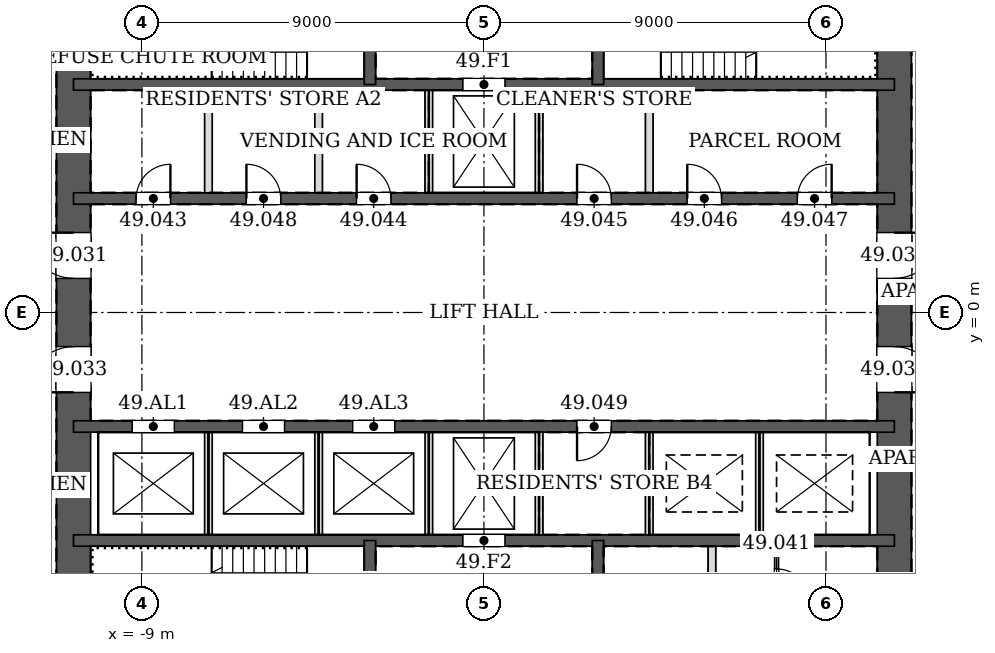
"""IFC4 building model, lengths in metres.
Left out: names, types, materials, properties, quantities, classifications, styles, units other than length and angle.
Written with IfcOpenShell. Run it as: python <this file> out.ifc"""

import sys

from ifc_helpers import new_model, si_unit, direction, frame, frame_2d, origin, place, context, subcontext, project, spatial, rectangle, extrude, element, fill, save


model = new_model("IFC4")
c1 = context("Model", 3, precision=1e-05, world=origin(), true_north=direction((0.0, 1.0)))
c2 = subcontext(c1, "Body", "Model", "MODEL_VIEW")
j1 = project(units=[si_unit("LENGTHUNIT", "METRE"), si_unit("PLANEANGLEUNIT", "RADIAN")], contexts=[c1])
p1 = place(None, origin())
s1 = spatial("IfcSite", under=j1, at=p1, CompositionType="ELEMENT")
p2 = place(p1, origin())
s2 = spatial("IfcBuilding", under=s1, at=p2, CompositionType="ELEMENT")
p3 = place(p2, frame((0.0, 0.0, 214.2)))
s3 = spatial("IfcBuildingStorey", under=s2, at=p3, CompositionType="ELEMENT", Elevation=214.2)
p4 = place(p3, frame((10.8, -10.8, 0.0), z_axis=(0.0, 0.0, 1.0), x_axis=(0.0, 1.0, 0.0)))
e1 = element("IfcWall", 1, at=p4, inside=s3, PredefinedType="SOLIDWALL", context=c2, shape_type="SweptSolid", body=[
    extrude(rectangle(XDim=21.6, YDim=0.9, at=frame_2d((10.8, 0.0))), origin(), (0.0, 0.0, 1.0), 3.4),
])
p5 = place(p4, frame((11.7, 0.0, 0.0)))
e2 = element("IfcOpeningElement", 2, at=p5, cuts=e1, PredefinedType="OPENING", context=c2, shape_type="SweptSolid", body=[
    extrude(rectangle(XDim=1.2, YDim=2.1, at=frame_2d((0.6, 1.05))), frame((0.0, 0.46, 0.0), z_axis=(0.0, -1.0, 0.0), x_axis=(1.0, 0.0, 0.0)), (0.0, 0.0, 1.0), 0.92),
])
p6 = place(p4, frame((8.7, 0.0, 0.0)))
e3 = element("IfcOpeningElement", 3, at=p6, cuts=e1, PredefinedType="OPENING", context=c2, shape_type="SweptSolid", body=[
    extrude(rectangle(XDim=1.2, YDim=2.1, at=frame_2d((0.6, 1.05))), frame((0.0, 0.46, 0.0), z_axis=(0.0, -1.0, 0.0), x_axis=(1.0, 0.0, 0.0)), (0.0, 0.0, 1.0), 0.92),
])
p7 = place(p3, frame((-10.8, 10.8, 0.0), z_axis=(0.0, 0.0, 1.0), x_axis=(0.0, -1.0, 0.0)))
e4 = element("IfcWall", 4, at=p7, inside=s3, PredefinedType="SOLIDWALL", context=c2, shape_type="SweptSolid", body=[
    extrude(rectangle(XDim=21.6, YDim=0.9, at=frame_2d((10.8, 0.0))), origin(), (0.0, 0.0, 1.0), 3.4),
])
p8 = place(p7, frame((8.7, 0.0, 0.0)))
e5 = element("IfcOpeningElement", 5, at=p8, cuts=e4, PredefinedType="OPENING", context=c2, shape_type="SweptSolid", body=[
    extrude(rectangle(XDim=1.2, YDim=2.1, at=frame_2d((0.6, 1.05))), frame((0.0, 0.46, 0.0), z_axis=(0.0, -1.0, 0.0), x_axis=(1.0, 0.0, 0.0)), (0.0, 0.0, 1.0), 0.92),
])
p9 = place(p7, frame((11.7, 0.0, 0.0)))
e6 = element("IfcOpeningElement", 6, at=p9, cuts=e4, PredefinedType="OPENING", context=c2, shape_type="SweptSolid", body=[
    extrude(rectangle(XDim=1.2, YDim=2.1, at=frame_2d((0.6, 1.05))), frame((0.0, 0.46, 0.0), z_axis=(0.0, -1.0, 0.0), x_axis=(1.0, 0.0, 0.0)), (0.0, 0.0, 1.0), 0.92),
])
p10 = place(p3, frame((-10.8, 3.0, 0.0), z_axis=(0.0, 0.0, 1.0), x_axis=(1.0, 0.0, 0.0)))
e7 = element("IfcWall", 7, at=p10, inside=s3, PredefinedType="SOLIDWALL", context=c2, shape_type="SweptSolid", body=[
    extrude(rectangle(XDim=21.6, YDim=0.3, at=frame_2d((10.8, 0.0))), origin(), (0.0, 0.0, 1.0), 3.4),
])
p11 = place(p10, frame((1.65, 0.0, 0.0)))
e8 = element("IfcOpeningElement", 8, at=p11, cuts=e7, PredefinedType="OPENING", context=c2, shape_type="SweptSolid", body=[
    extrude(rectangle(XDim=0.9, YDim=2.1, at=frame_2d((0.45, 1.05))), frame((0.0, 0.16, 0.0), z_axis=(0.0, -1.0, 0.0), x_axis=(1.0, 0.0, 0.0)), (0.0, 0.0, 1.0), 0.32),
])
p12 = place(p10, frame((7.45, 0.0, 0.0)))
e9 = element("IfcOpeningElement", 9, at=p12, cuts=e7, PredefinedType="OPENING", context=c2, shape_type="SweptSolid", body=[
    extrude(rectangle(XDim=0.9, YDim=2.1, at=frame_2d((0.45, 1.05))), frame((0.0, 0.16, 0.0), z_axis=(0.0, -1.0, 0.0), x_axis=(1.0, 0.0, 0.0)), (0.0, 0.0, 1.0), 0.32),
])
p13 = place(p10, frame((13.25, 0.0, 0.0)))
e10 = element("IfcOpeningElement", 10, at=p13, cuts=e7, PredefinedType="OPENING", context=c2, shape_type="SweptSolid", body=[
    extrude(rectangle(XDim=0.9, YDim=2.1, at=frame_2d((0.45, 1.05))), frame((0.0, 0.16, 0.0), z_axis=(0.0, -1.0, 0.0), x_axis=(1.0, 0.0, 0.0)), (0.0, 0.0, 1.0), 0.32),
])
p14 = place(p10, frame((16.15, 0.0, 0.0)))
e11 = element("IfcOpeningElement", 11, at=p14, cuts=e7, PredefinedType="OPENING", context=c2, shape_type="SweptSolid", body=[
    extrude(rectangle(XDim=0.9, YDim=2.1, at=frame_2d((0.45, 1.05))), frame((0.0, 0.16, 0.0), z_axis=(0.0, -1.0, 0.0), x_axis=(1.0, 0.0, 0.0)), (0.0, 0.0, 1.0), 0.32),
])
p15 = place(p10, frame((19.05, 0.0, 0.0)))
e12 = element("IfcOpeningElement", 12, at=p15, cuts=e7, PredefinedType="OPENING", context=c2, shape_type="SweptSolid", body=[
    extrude(rectangle(XDim=0.9, YDim=2.1, at=frame_2d((0.45, 1.05))), frame((0.0, 0.16, 0.0), z_axis=(0.0, -1.0, 0.0), x_axis=(1.0, 0.0, 0.0)), (0.0, 0.0, 1.0), 0.32),
])
p16 = place(p10, frame((4.55, 0.0, 0.0)))
e13 = element("IfcOpeningElement", 13, at=p16, cuts=e7, PredefinedType="OPENING", context=c2, shape_type="SweptSolid", body=[
    extrude(rectangle(XDim=0.9, YDim=2.1, at=frame_2d((0.45, 1.05))), frame((0.0, 0.16, 0.0), z_axis=(0.0, -1.0, 0.0), x_axis=(1.0, 0.0, 0.0)), (0.0, 0.0, 1.0), 0.32),
])
p17 = place(p3, frame((-10.8, 6.0, 0.0), z_axis=(0.0, 0.0, 1.0), x_axis=(1.0, 0.0, 0.0)))
e14 = element("IfcWall", 14, at=p17, inside=s3, PredefinedType="SOLIDWALL", context=c2, shape_type="SweptSolid", body=[
    extrude(rectangle(XDim=21.6, YDim=0.3, at=frame_2d((10.8, 0.0))), origin(), (0.0, 0.0, 1.0), 3.4),
])
p18 = place(p17, frame((10.25, 0.0, 0.0)))
e15 = element("IfcOpeningElement", 15, at=p18, cuts=e14, PredefinedType="OPENING", context=c2, shape_type="SweptSolid", body=[
    extrude(rectangle(XDim=1.1, YDim=2.1, at=frame_2d((0.55, 1.05))), frame((0.0, 0.16, 0.0), z_axis=(0.0, -1.0, 0.0), x_axis=(1.0, 0.0, 0.0)), (0.0, 0.0, 1.0), 0.32),
])
p19 = place(p3, frame((-3.0, 6.0, 0.0), z_axis=(0.0, 0.0, 1.0), x_axis=(0.0, 1.0, 0.0)))
e16 = element("IfcWall", 16, at=p19, inside=s3, PredefinedType="SOLIDWALL", context=c2, shape_type="SweptSolid", body=[
    extrude(rectangle(XDim=4.8, YDim=0.3, at=frame_2d((2.4, 0.0))), origin(), (0.0, 0.0, 1.0), 3.4),
])
p20 = place(p19, frame((1.75, 0.0, 0.0)))
e17 = element("IfcOpeningElement", 17, at=p20, cuts=e16, PredefinedType="OPENING", context=c2, shape_type="SweptSolid", body=[
    extrude(rectangle(XDim=1.0, YDim=2.1, at=frame_2d((0.5, 1.05))), frame((0.0, 0.16, 0.0), z_axis=(0.0, -1.0, 0.0), x_axis=(1.0, 0.0, 0.0)), (0.0, 0.0, 1.0), 0.32),
])
p21 = place(p3, frame((3.0, 6.0, 0.0), z_axis=(0.0, 0.0, 1.0), x_axis=(0.0, 1.0, 0.0)))
e18 = element("IfcWall", 18, at=p21, inside=s3, PredefinedType="SOLIDWALL", context=c2, shape_type="SweptSolid", body=[
    extrude(rectangle(XDim=4.8, YDim=0.3, at=frame_2d((2.4, 0.0))), origin(), (0.0, 0.0, 1.0), 3.4),
])
p22 = place(p21, frame((1.75, 0.0, 0.0)))
e19 = element("IfcOpeningElement", 19, at=p22, cuts=e18, PredefinedType="OPENING", context=c2, shape_type="SweptSolid", body=[
    extrude(rectangle(XDim=1.0, YDim=2.1, at=frame_2d((0.5, 1.05))), frame((0.0, 0.16, 0.0), z_axis=(0.0, -1.0, 0.0), x_axis=(1.0, 0.0, 0.0)), (0.0, 0.0, 1.0), 0.32),
])
p23 = place(p3, frame((-10.8, -3.0, 0.0), z_axis=(0.0, 0.0, 1.0), x_axis=(1.0, 0.0, 0.0)))
e20 = element("IfcWall", 20, at=p23, inside=s3, PredefinedType="SOLIDWALL", context=c2, shape_type="SweptSolid", body=[
    extrude(rectangle(XDim=21.6, YDim=0.3, at=frame_2d((10.8, 0.0))), origin(), (0.0, 0.0, 1.0), 3.4),
])
p24 = place(p23, frame((13.25, 0.0, 0.0)))
e21 = element("IfcOpeningElement", 21, at=p24, cuts=e20, PredefinedType="OPENING", context=c2, shape_type="SweptSolid", body=[
    extrude(rectangle(XDim=0.9, YDim=2.1, at=frame_2d((0.45, 1.05))), frame((0.0, 0.16, 0.0), z_axis=(0.0, -1.0, 0.0), x_axis=(1.0, 0.0, 0.0)), (0.0, 0.0, 1.0), 0.32),
])
p25 = place(p23, frame((1.55, 0.0, 0.0)))
e22 = element("IfcOpeningElement", 22, at=p25, cuts=e20, PredefinedType="OPENING", context=c2, shape_type="SweptSolid", body=[
    extrude(rectangle(XDim=1.1, YDim=2.1, at=frame_2d((0.55, 1.05))), frame((0.0, 0.16, 0.0), z_axis=(0.0, -1.0, 0.0), x_axis=(1.0, 0.0, 0.0)), (0.0, 0.0, 1.0), 0.32),
])
p26 = place(p23, frame((4.45, 0.0, 0.0)))
e23 = element("IfcOpeningElement", 23, at=p26, cuts=e20, PredefinedType="OPENING", context=c2, shape_type="SweptSolid", body=[
    extrude(rectangle(XDim=1.1, YDim=2.1, at=frame_2d((0.55, 1.05))), frame((0.0, 0.16, 0.0), z_axis=(0.0, -1.0, 0.0), x_axis=(1.0, 0.0, 0.0)), (0.0, 0.0, 1.0), 0.32),
])
p27 = place(p23, frame((7.35, 0.0, 0.0)))
e24 = element("IfcOpeningElement", 24, at=p27, cuts=e20, PredefinedType="OPENING", context=c2, shape_type="SweptSolid", body=[
    extrude(rectangle(XDim=1.1, YDim=2.1, at=frame_2d((0.55, 1.05))), frame((0.0, 0.16, 0.0), z_axis=(0.0, -1.0, 0.0), x_axis=(1.0, 0.0, 0.0)), (0.0, 0.0, 1.0), 0.32),
])
p28 = place(p3, frame((-10.8, -6.0, 0.0), z_axis=(0.0, 0.0, 1.0), x_axis=(1.0, 0.0, 0.0)))
e25 = element("IfcWall", 25, at=p28, inside=s3, PredefinedType="SOLIDWALL", context=c2, shape_type="SweptSolid", body=[
    extrude(rectangle(XDim=21.6, YDim=0.3, at=frame_2d((10.8, 0.0))), origin(), (0.0, 0.0, 1.0), 3.4),
])
p29 = place(p28, frame((10.25, 0.0, 0.0)))
e26 = element("IfcOpeningElement", 26, at=p29, cuts=e25, PredefinedType="OPENING", context=c2, shape_type="SweptSolid", body=[
    extrude(rectangle(XDim=1.1, YDim=2.1, at=frame_2d((0.55, 1.05))), frame((0.0, 0.16, 0.0), z_axis=(0.0, -1.0, 0.0), x_axis=(1.0, 0.0, 0.0)), (0.0, 0.0, 1.0), 0.32),
])
p30 = place(p3, frame((-3.0, -6.0, 0.0), z_axis=(0.0, 0.0, 1.0), x_axis=(0.0, -1.0, 0.0)))
e27 = element("IfcWall", 27, at=p30, inside=s3, PredefinedType="SOLIDWALL", context=c2, shape_type="SweptSolid", body=[
    extrude(rectangle(XDim=4.8, YDim=0.3, at=frame_2d((2.4, 0.0))), origin(), (0.0, 0.0, 1.0), 3.4),
])
p31 = place(p30, frame((1.75, 0.0, 0.0)))
e28 = element("IfcOpeningElement", 28, at=p31, cuts=e27, PredefinedType="OPENING", context=c2, shape_type="SweptSolid", body=[
    extrude(rectangle(XDim=1.0, YDim=2.1, at=frame_2d((0.5, 1.05))), frame((0.0, 0.16, 0.0), z_axis=(0.0, -1.0, 0.0), x_axis=(1.0, 0.0, 0.0)), (0.0, 0.0, 1.0), 0.32),
])
p32 = place(p3, frame((3.0, -6.0, 0.0), z_axis=(0.0, 0.0, 1.0), x_axis=(0.0, -1.0, 0.0)))
e29 = element("IfcWall", 29, at=p32, inside=s3, PredefinedType="SOLIDWALL", context=c2, shape_type="SweptSolid", body=[
    extrude(rectangle(XDim=4.8, YDim=0.3, at=frame_2d((2.4, 0.0))), origin(), (0.0, 0.0, 1.0), 3.4),
])
for number, where, z_axis, x_axis in (
    (30, (-7.25, 3.15, 0.0), (0.0, 0.0, 1.0), (0.0, 1.0, 0.0)),
    (31, (-4.35, 3.15, 0.0), (0.0, 0.0, 1.0), (0.0, 1.0, 0.0)),
    (32, (-1.45, 3.15, 0.0), (0.0, 0.0, 1.0), (0.0, 1.0, 0.0)),
    (33, (1.45, 3.15, 0.0), (0.0, 0.0, 1.0), (0.0, 1.0, 0.0)),
    (34, (4.35, 3.15, 0.0), (0.0, 0.0, 1.0), (0.0, 1.0, 0.0)),
):
    element("IfcWall", number, at=place(p3, frame(where, z_axis=z_axis, x_axis=x_axis)), inside=s3, PredefinedType="PARTITIONING", context=c2, shape_type="SweptSolid", body=[
        extrude(rectangle(XDim=2.7, YDim=0.2, at=frame_2d((1.35, 0.0))), origin(), (0.0, 0.0, 1.0), 3.2),
    ])
for number, where, z_axis, x_axis in (
    (35, (-7.25, -5.85, 0.0), (0.0, 0.0, 1.0), (0.0, 1.0, 0.0)),
    (36, (-4.35, -5.85, 0.0), (0.0, 0.0, 1.0), (0.0, 1.0, 0.0)),
    (37, (-1.45, -5.85, 0.0), (0.0, 0.0, 1.0), (0.0, 1.0, 0.0)),
):
    element("IfcWall", number, at=place(p3, frame(where, z_axis=z_axis, x_axis=x_axis)), inside=s3, PredefinedType="PARTITIONING", context=c2, shape_type="SweptSolid", body=[
        extrude(rectangle(XDim=2.7, YDim=0.2, at=frame_2d((1.35, 0.0))), origin(), (0.0, 0.0, 1.0), 3.4),
    ])
for number, where, z_axis, x_axis in (
    (38, (1.45, -5.85, 0.0), (0.0, 0.0, 1.0), (0.0, 1.0, 0.0)),
    (39, (4.35, -5.85, 0.0), (0.0, 0.0, 1.0), (0.0, 1.0, 0.0)),
):
    element("IfcWall", number, at=place(p3, frame(where, z_axis=z_axis, x_axis=x_axis)), inside=s3, PredefinedType="PARTITIONING", context=c2, shape_type="SweptSolid", body=[
        extrude(rectangle(XDim=2.7, YDim=0.2, at=frame_2d((1.35, 0.0))), origin(), (0.0, 0.0, 1.0), 3.2),
    ])
p33 = place(p3, frame((7.25, -5.85, 0.0), z_axis=(0.0, 0.0, 1.0), x_axis=(0.0, 1.0, 0.0)))
e40 = element("IfcWall", 40, at=p33, inside=s3, PredefinedType="PARTITIONING", context=c2, shape_type="SweptSolid", body=[
    extrude(rectangle(XDim=2.7, YDim=0.2, at=frame_2d((1.35, 0.0))), origin(), (0.0, 0.0, 1.0), 3.4),
])
p34 = place(p3, frame((6.0, -10.35, 0.0), z_axis=(0.0, 0.0, 1.0), x_axis=(0.0, 1.0, 0.0)))
e41 = element("IfcWall", 41, at=p34, inside=s3, PredefinedType="PARTITIONING", context=c2, shape_type="SweptSolid", body=[
    extrude(rectangle(XDim=4.2, YDim=0.2, at=frame_2d((2.1, 0.0))), origin(), (0.0, 0.0, 1.0), 3.2),
])
p35 = place(p34, frame((0.3, 0.0, 0.0)))
e42 = element("IfcOpeningElement", 42, at=p35, cuts=e41, PredefinedType="OPENING", context=c2, shape_type="SweptSolid", body=[
    extrude(rectangle(XDim=0.9, YDim=2.1, at=frame_2d((0.45, 1.05))), frame((0.0, 0.11, 0.0), z_axis=(0.0, -1.0, 0.0), x_axis=(1.0, 0.0, 0.0)), (0.0, 0.0, 1.0), 0.22),
])
p36 = place(p3, frame((7.7, -10.35, 0.0), z_axis=(0.0, 0.0, 1.0), x_axis=(0.0, 1.0, 0.0)))
e43 = element("IfcWall", 43, at=p36, inside=s3, PredefinedType="PARTITIONING", context=c2, shape_type="SweptSolid", body=[
    extrude(rectangle(XDim=4.2, YDim=0.1, at=frame_2d((2.1, 0.0))), origin(), (0.0, 0.0, 1.0), 3.2),
])
p37 = place(p36, frame((2.7, 0.0, 0.0)))
e44 = element("IfcOpeningElement", 44, at=p37, cuts=e43, PredefinedType="OPENING", context=c2, shape_type="SweptSolid", body=[
    extrude(rectangle(XDim=0.9, YDim=2.1, at=frame_2d((0.45, 1.05))), frame((0.0, 0.06, 0.0), z_axis=(0.0, -1.0, 0.0), x_axis=(1.0, 0.0, 0.0)), (0.0, 0.0, 1.0), 0.12),
])
p38 = place(p36, frame((0.6, 0.0, 0.0)))
e45 = element("IfcOpeningElement", 45, at=p38, cuts=e43, PredefinedType="OPENING", context=c2, shape_type="SweptSolid", body=[
    extrude(rectangle(XDim=0.9, YDim=2.1, at=frame_2d((0.45, 1.05))), frame((0.0, 0.06, 0.0), z_axis=(0.0, -1.0, 0.0), x_axis=(1.0, 0.0, 0.0)), (0.0, 0.0, 1.0), 0.12),
])
p39 = place(p5, frame((1.2, 0.0, 0.0), z_axis=(0.0, 0.0, 1.0), x_axis=(-1.0, 0.0, 0.0)))
e46 = element("IfcDoor", 46, at=p39, inside=s3, OperationType="SINGLE_SWING_LEFT", PredefinedType="DOOR", context=c2, shape_type="SweptSolid", body=[
    extrude(rectangle(XDim=1.2, YDim=2.1, at=frame_2d((0.6, 1.05))), frame((0.0, 0.025, 0.0), z_axis=(0.0, -1.0, 0.0), x_axis=(1.0, 0.0, 0.0)), (0.0, 0.0, 1.0), 0.05),
])
fill(e2, e46)
p40 = place(p8, frame((1.2, 0.0, 0.0), z_axis=(0.0, 0.0, 1.0), x_axis=(-1.0, 0.0, 0.0)))
e47 = element("IfcDoor", 47, at=p40, inside=s3, OperationType="SINGLE_SWING_RIGHT", PredefinedType="DOOR", context=c2, shape_type="SweptSolid", body=[
    extrude(rectangle(XDim=1.2, YDim=2.1, at=frame_2d((0.6, 1.05))), frame((0.0, 0.025, 0.0), z_axis=(0.0, -1.0, 0.0), x_axis=(1.0, 0.0, 0.0)), (0.0, 0.0, 1.0), 0.05),
])
fill(e5, e47)
p41 = place(p6, frame((1.2, 0.0, 0.0), z_axis=(0.0, 0.0, 1.0), x_axis=(-1.0, 0.0, 0.0)))
e48 = element("IfcDoor", 48, at=p41, inside=s3, OperationType="SINGLE_SWING_RIGHT", PredefinedType="DOOR", context=c2, shape_type="SweptSolid", body=[
    extrude(rectangle(XDim=1.2, YDim=2.1, at=frame_2d((0.6, 1.05))), frame((0.0, 0.025, 0.0), z_axis=(0.0, -1.0, 0.0), x_axis=(1.0, 0.0, 0.0)), (0.0, 0.0, 1.0), 0.05),
])
fill(e3, e48)
p42 = place(p9, frame((1.2, 0.0, 0.0), z_axis=(0.0, 0.0, 1.0), x_axis=(-1.0, 0.0, 0.0)))
e49 = element("IfcDoor", 49, at=p42, inside=s3, OperationType="SINGLE_SWING_LEFT", PredefinedType="DOOR", context=c2, shape_type="SweptSolid", body=[
    extrude(rectangle(XDim=1.2, YDim=2.1, at=frame_2d((0.6, 1.05))), frame((0.0, 0.025, 0.0), z_axis=(0.0, -1.0, 0.0), x_axis=(1.0, 0.0, 0.0)), (0.0, 0.0, 1.0), 0.05),
])
fill(e6, e49)
p43 = place(p37, frame((0.9, 0.0, 0.0), z_axis=(0.0, 0.0, 1.0), x_axis=(-1.0, 0.0, 0.0)))
e50 = element("IfcDoor", 50, at=p43, inside=s3, OperationType="SINGLE_SWING_RIGHT", PredefinedType="DOOR", context=c2, shape_type="SweptSolid", body=[
    extrude(rectangle(XDim=0.9, YDim=2.1, at=frame_2d((0.45, 1.05))), frame((0.0, 0.025, 0.0), z_axis=(0.0, -1.0, 0.0), x_axis=(1.0, 0.0, 0.0)), (0.0, 0.0, 1.0), 0.05),
])
fill(e44, e50)
p44 = place(p11, origin())
e51 = element("IfcDoor", 51, at=p44, inside=s3, OperationType="SINGLE_SWING_RIGHT", PredefinedType="DOOR", context=c2, shape_type="SweptSolid", body=[
    extrude(rectangle(XDim=0.9, YDim=2.1, at=frame_2d((0.45, 1.05))), frame((0.0, 0.025, 0.0), z_axis=(0.0, -1.0, 0.0), x_axis=(1.0, 0.0, 0.0)), (0.0, 0.0, 1.0), 0.05),
])
fill(e8, e51)
p45 = place(p12, origin())
e52 = element("IfcDoor", 52, at=p45, inside=s3, OperationType="SINGLE_SWING_LEFT", PredefinedType="DOOR", context=c2, shape_type="SweptSolid", body=[
    extrude(rectangle(XDim=0.9, YDim=2.1, at=frame_2d((0.45, 1.05))), frame((0.0, 0.025, 0.0), z_axis=(0.0, -1.0, 0.0), x_axis=(1.0, 0.0, 0.0)), (0.0, 0.0, 1.0), 0.05),
])
fill(e9, e52)
p46 = place(p13, origin())
e53 = element("IfcDoor", 53, at=p46, inside=s3, OperationType="SINGLE_SWING_LEFT", PredefinedType="DOOR", context=c2, shape_type="SweptSolid", body=[
    extrude(rectangle(XDim=0.9, YDim=2.1, at=frame_2d((0.45, 1.05))), frame((0.0, 0.025, 0.0), z_axis=(0.0, -1.0, 0.0), x_axis=(1.0, 0.0, 0.0)), (0.0, 0.0, 1.0), 0.05),
])
fill(e10, e53)
p47 = place(p14, origin())
e54 = element("IfcDoor", 54, at=p47, inside=s3, OperationType="SINGLE_SWING_LEFT", PredefinedType="DOOR", context=c2, shape_type="SweptSolid", body=[
    extrude(rectangle(XDim=0.9, YDim=2.1, at=frame_2d((0.45, 1.05))), frame((0.0, 0.025, 0.0), z_axis=(0.0, -1.0, 0.0), x_axis=(1.0, 0.0, 0.0)), (0.0, 0.0, 1.0), 0.05),
])
fill(e11, e54)
p48 = place(p15, origin())
e55 = element("IfcDoor", 55, at=p48, inside=s3, OperationType="SINGLE_SWING_RIGHT", PredefinedType="DOOR", context=c2, shape_type="SweptSolid", body=[
    extrude(rectangle(XDim=0.9, YDim=2.1, at=frame_2d((0.45, 1.05))), frame((0.0, 0.025, 0.0), z_axis=(0.0, -1.0, 0.0), x_axis=(1.0, 0.0, 0.0)), (0.0, 0.0, 1.0), 0.05),
])
fill(e12, e55)
p49 = place(p16, origin())
e56 = element("IfcDoor", 56, at=p49, inside=s3, OperationType="SINGLE_SWING_LEFT", PredefinedType="DOOR", context=c2, shape_type="SweptSolid", body=[
    extrude(rectangle(XDim=0.9, YDim=2.1, at=frame_2d((0.45, 1.05))), frame((0.0, 0.025, 0.0), z_axis=(0.0, -1.0, 0.0), x_axis=(1.0, 0.0, 0.0)), (0.0, 0.0, 1.0), 0.05),
])
fill(e13, e56)
p50 = place(p24, frame((0.9, 0.0, 0.0), z_axis=(0.0, 0.0, 1.0), x_axis=(-1.0, 0.0, 0.0)))
e57 = element("IfcDoor", 57, at=p50, inside=s3, OperationType="SINGLE_SWING_RIGHT", PredefinedType="DOOR", context=c2, shape_type="SweptSolid", body=[
    extrude(rectangle(XDim=0.9, YDim=2.1, at=frame_2d((0.45, 1.05))), frame((0.0, 0.025, 0.0), z_axis=(0.0, -1.0, 0.0), x_axis=(1.0, 0.0, 0.0)), (0.0, 0.0, 1.0), 0.05),
])
fill(e21, e57)
p51 = place(p18, origin())
e58 = element("IfcDoor", 58, at=p51, inside=s3, OperationType="DOUBLE_DOOR_SLIDING", PredefinedType="DOOR", context=c2, shape_type="SweptSolid", body=[
    extrude(rectangle(XDim=1.1, YDim=2.1, at=frame_2d((0.55, 1.05))), frame((0.0, 0.025, 0.0), z_axis=(0.0, -1.0, 0.0), x_axis=(1.0, 0.0, 0.0)), (0.0, 0.0, 1.0), 0.05),
])
fill(e15, e58)
p52 = place(p29, origin())
e59 = element("IfcDoor", 59, at=p52, inside=s3, OperationType="DOUBLE_DOOR_SLIDING", PredefinedType="DOOR", context=c2, shape_type="SweptSolid", body=[
    extrude(rectangle(XDim=1.1, YDim=2.1, at=frame_2d((0.55, 1.05))), frame((0.0, 0.025, 0.0), z_axis=(0.0, -1.0, 0.0), x_axis=(1.0, 0.0, 0.0)), (0.0, 0.0, 1.0), 0.05),
])
fill(e26, e59)
p53 = place(p25, origin())
e60 = element("IfcDoor", 60, at=p53, inside=s3, OperationType="DOUBLE_DOOR_SLIDING", PredefinedType="DOOR", context=c2, shape_type="SweptSolid", body=[
    extrude(rectangle(XDim=1.1, YDim=2.1, at=frame_2d((0.55, 1.05))), frame((0.0, 0.025, 0.0), z_axis=(0.0, -1.0, 0.0), x_axis=(1.0, 0.0, 0.0)), (0.0, 0.0, 1.0), 0.05),
])
fill(e22, e60)
p54 = place(p26, origin())
e61 = element("IfcDoor", 61, at=p54, inside=s3, OperationType="DOUBLE_DOOR_SLIDING", PredefinedType="DOOR", context=c2, shape_type="SweptSolid", body=[
    extrude(rectangle(XDim=1.1, YDim=2.1, at=frame_2d((0.55, 1.05))), frame((0.0, 0.025, 0.0), z_axis=(0.0, -1.0, 0.0), x_axis=(1.0, 0.0, 0.0)), (0.0, 0.0, 1.0), 0.05),
])
fill(e23, e61)
p55 = place(p27, origin())
e62 = element("IfcDoor", 62, at=p55, inside=s3, OperationType="DOUBLE_DOOR_SLIDING", PredefinedType="DOOR", context=c2, shape_type="SweptSolid", body=[
    extrude(rectangle(XDim=1.1, YDim=2.1, at=frame_2d((0.55, 1.05))), frame((0.0, 0.025, 0.0), z_axis=(0.0, -1.0, 0.0), x_axis=(1.0, 0.0, 0.0)), (0.0, 0.0, 1.0), 0.05),
])
fill(e24, e62)
save(model, sys.argv[1])
